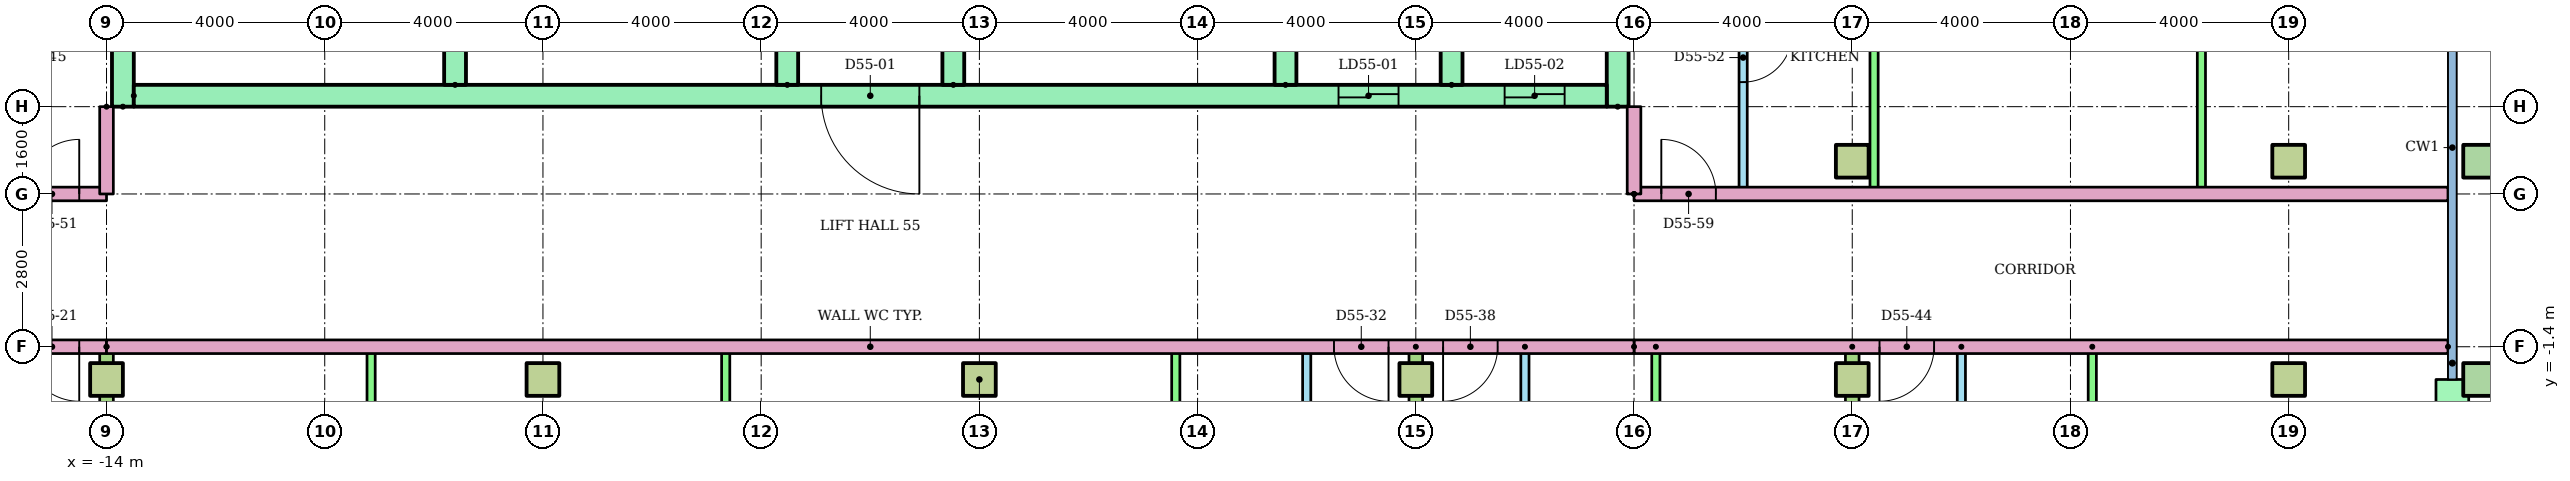
"""IFC4 building model, lengths in metres.
Left out: names, types, materials, properties, quantities, classifications, styles, units other than length and angle.
Written with IfcOpenShell. Run it as: python <this file> out.ifc"""

import sys

from ifc_helpers import new_model, si_unit, direction, frame, frame_2d, origin, origin_2d, place, context, subcontext, project, spatial, rectangle, hollow_rectangle, extrude, element, fill, save


model = new_model("IFC4")
c1 = context("Model", 3, precision=1e-05, world=origin(), true_north=direction((0.0, 1.0)))
c2 = subcontext(c1, "Body", "Model", "MODEL_VIEW")
j1 = project(units=[si_unit("LENGTHUNIT", "METRE"), si_unit("PLANEANGLEUNIT", "RADIAN")], contexts=[c1])
p1 = place(None, origin())
s1 = spatial("IfcSite", under=j1, at=p1, CompositionType="ELEMENT")
p2 = place(p1, origin())
s2 = spatial("IfcBuilding", under=s1, at=p2, CompositionType="ELEMENT")
p3 = place(p2, frame((0.0, 0.0, 214.0)))
s3 = spatial("IfcBuildingStorey", under=s2, at=p3, CompositionType="ELEMENT", Elevation=214.0)
for number, where in (
    (1, (-14.0, -2.0, 0.0)),
    (2, (-6.0, -2.0, 0.0)),
    (3, (2.0, -2.0, 0.0)),
    (4, (10.0, -2.0, 0.0)),
    (5, (18.0, -2.0, 0.0)),
    (6, (26.0, -2.0, 0.0)),
):
    element("IfcColumn", number, at=place(p3, frame(where)), inside=s3, PredefinedType="COLUMN", context=c2, shape_type="SweptSolid", body=[
        extrude(rectangle(XDim=0.6, YDim=0.6, at=origin_2d()), origin(), (0.0, 0.0, 1.0), 3.2),
    ])
p4 = place(p3, frame((29.5, -2.0, 0.0)))
e7 = element("IfcColumn", 7, at=p4, inside=s3, PredefinedType="COLUMN", context=c2, shape_type="SweptSolid", body=[
    extrude(hollow_rectangle(XDim=0.6, YDim=0.6, WallThickness=0.03, at=origin_2d()), origin(), (0.0, 0.0, 1.0), 3.2),
])
for number, where in (
    (8, (18.0, 2.0, 0.0)),
    (9, (26.0, 2.0, 0.0)),
):
    element("IfcColumn", number, at=place(p3, frame(where)), inside=s3, PredefinedType="COLUMN", context=c2, shape_type="SweptSolid", body=[
        extrude(rectangle(XDim=0.6, YDim=0.6, at=origin_2d()), origin(), (0.0, 0.0, 1.0), 3.2),
    ])
p5 = place(p3, frame((29.5, 2.0, 0.0)))
e10 = element("IfcColumn", 10, at=p5, inside=s3, PredefinedType="COLUMN", context=c2, shape_type="SweptSolid", body=[
    extrude(hollow_rectangle(XDim=0.6, YDim=0.6, WallThickness=0.03, at=origin_2d()), origin(), (0.0, 0.0, 1.0), 3.2),
])
p6 = place(p3, frame((29.0, -5.7, 0.0), z_axis=(0.0, 0.0, 1.0), x_axis=(0.0, 1.0, 0.0)))
e11 = element("IfcWall", 11, at=p6, inside=s3, PredefinedType="STANDARD", context=c2, shape_type="SweptSolid", body=[
    extrude(rectangle(XDim=3.7, YDim=0.6, at=frame_2d((1.85, 0.0))), origin(), (0.0, 0.0, 1.0), 2.92),
])
p7 = place(p6, frame((1.25, 0.0, 0.0)))
e12 = element("IfcOpeningElement", 12, at=p7, cuts=e11, PredefinedType="OPENING", context=c2, shape_type="SweptSolid", body=[
    extrude(rectangle(XDim=1.2, YDim=2.1, at=frame_2d((0.6, 1.05))), frame((0.0, 0.31, 0.0), z_axis=(0.0, -1.0, 0.0), x_axis=(1.0, 0.0, 0.0)), (0.0, 0.0, 1.0), 0.62),
])
for number, where, z_axis, x_axis in (
    (13, (-13.7, 3.0, 0.0), (0.0, 0.0, 1.0), (0.0, 1.0, 0.0)),
    (14, (13.7, 3.0, 0.0), (0.0, 0.0, 1.0), (0.0, 1.0, 0.0)),
):
    element("IfcWall", number, at=place(p3, frame(where, z_axis=z_axis, x_axis=x_axis)), inside=s3, PredefinedType="SHEAR", context=c2, shape_type="SweptSolid", body=[
        extrude(rectangle(XDim=17.0, YDim=0.4, at=frame_2d((8.5, 0.0))), origin(), (0.0, 0.0, 1.0), 2.92),
    ])
p8 = place(p3, frame((-13.5, 3.2, 0.0)))
e15 = element("IfcWall", 15, at=p8, inside=s3, PredefinedType="SHEAR", context=c2, shape_type="SweptSolid", body=[
    extrude(rectangle(XDim=27.0, YDim=0.4, at=frame_2d((13.5, 0.0))), origin(), (0.0, 0.0, 1.0), 2.92),
])
p9 = place(p8, frame((22.083, 0.0, 0.0)))
e16 = element("IfcOpeningElement", 16, at=p9, cuts=e15, PredefinedType="OPENING", context=c2, shape_type="SweptSolid", body=[
    extrude(rectangle(XDim=1.1, YDim=2.1, at=frame_2d((0.55, 1.05))), frame((0.0, 0.21, 0.0), z_axis=(0.0, -1.0, 0.0), x_axis=(1.0, 0.0, 0.0)), (0.0, 0.0, 1.0), 0.42),
])
p10 = place(p8, frame((25.128, 0.0, 0.0)))
e17 = element("IfcOpeningElement", 17, at=p10, cuts=e15, PredefinedType="OPENING", context=c2, shape_type="SweptSolid", body=[
    extrude(rectangle(XDim=1.1, YDim=2.1, at=frame_2d((0.55, 1.05))), frame((0.0, 0.21, 0.0), z_axis=(0.0, -1.0, 0.0), x_axis=(1.0, 0.0, 0.0)), (0.0, 0.0, 1.0), 0.42),
])
p11 = place(p8, frame((12.6, 0.0, 0.0)))
e18 = element("IfcOpeningElement", 18, at=p11, cuts=e15, PredefinedType="OPENING", context=c2, shape_type="SweptSolid", body=[
    extrude(rectangle(XDim=1.8, YDim=2.1, at=frame_2d((0.9, 1.05))), frame((0.0, 0.21, 0.0), z_axis=(0.0, -1.0, 0.0), x_axis=(1.0, 0.0, 0.0)), (0.0, 0.0, 1.0), 0.42),
])
for number, where, z_axis, x_axis in (
    (19, (-7.611, 3.4, 0.0), (0.0, 0.0, 1.0), (0.0, 1.0, 0.0)),
    (20, (-1.522, 3.4, 0.0), (0.0, 0.0, 1.0), (0.0, 1.0, 0.0)),
    (21, (1.522, 3.4, 0.0), (0.0, 0.0, 1.0), (0.0, 1.0, 0.0)),
    (22, (7.611, 3.4, 0.0), (0.0, 0.0, 1.0), (0.0, 1.0, 0.0)),
    (23, (10.656, 3.4, 0.0), (0.0, 0.0, 1.0), (0.0, 1.0, 0.0)),
):
    element("IfcWall", number, at=place(p3, frame(where, z_axis=z_axis, x_axis=x_axis)), inside=s3, PredefinedType="SHEAR", context=c2, shape_type="SweptSolid", body=[
        extrude(rectangle(XDim=3.0, YDim=0.4, at=frame_2d((1.5, 0.0))), origin(), (0.0, 0.0, 1.0), 2.92),
    ])
p12 = place(p3, frame((8.0, -8.2, 0.0), z_axis=(0.0, 0.0, 1.0), x_axis=(0.0, 1.0, 0.0)))
e24 = element("IfcWall", 24, at=p12, inside=s3, PredefinedType="PARTITIONING", context=c2, shape_type="SweptSolid", body=[
    extrude(rectangle(XDim=6.8, YDim=0.15, at=frame_2d((3.4, 0.0))), origin(), (0.0, 0.0, 1.0), 2.4),
])
p13 = place(p12, frame((4.475, 0.0, 0.0)))
e25 = element("IfcOpeningElement", 25, at=p13, cuts=e24, PredefinedType="OPENING", context=c2, shape_type="SweptSolid", body=[
    extrude(rectangle(XDim=0.9, YDim=2.1, at=frame_2d((0.45, 1.05))), frame((0.0, 0.085, 0.0), z_axis=(0.0, -1.0, 0.0), x_axis=(1.0, 0.0, 0.0)), (0.0, 0.0, 1.0), 0.17),
])
p14 = place(p12, frame((1.125, 0.0, 0.0)))
e26 = element("IfcOpeningElement", 26, at=p14, cuts=e24, PredefinedType="OPENING", context=c2, shape_type="SweptSolid", body=[
    extrude(rectangle(XDim=0.8, YDim=2.1, at=frame_2d((0.4, 1.05))), frame((0.0, 0.085, 0.0), z_axis=(0.0, -1.0, 0.0), x_axis=(1.0, 0.0, 0.0)), (0.0, 0.0, 1.0), 0.17),
])
for number, where, z_axis, x_axis in (
    (27, (5.6, -8.2, 0.0), (0.0, 0.0, 1.0), (0.0, 1.0, 0.0)),
    (28, (-2.65, -8.2, 0.0), (0.0, 0.0, 1.0), (0.0, 1.0, 0.0)),
    (29, (-9.15, -8.2, 0.0), (0.0, 0.0, 1.0), (0.0, 1.0, 0.0)),
):
    element("IfcWall", number, at=place(p3, frame(where, z_axis=z_axis, x_axis=x_axis)), inside=s3, PredefinedType="PARTITIONING", context=c2, shape_type="SweptSolid", body=[
        extrude(rectangle(XDim=6.8, YDim=0.15, at=frame_2d((3.4, 0.0))), origin(), (0.0, 0.0, 1.0), 2.4),
    ])
p15 = place(p3, frame((-14.0, -1.4, 0.0), z_axis=(0.0, 0.0, 1.0), x_axis=(0.0, -1.0, 0.0)))
e30 = element("IfcWall", 30, at=p15, inside=s3, PredefinedType="PARTITIONING", context=c2, shape_type="SweptSolid", body=[
    extrude(rectangle(XDim=15.11, YDim=0.25, at=frame_2d((7.555, 0.0))), origin(), (0.0, 0.0, 1.0), 2.4),
])
p16 = place(p3, frame((12.0, -1.4, 0.0), z_axis=(0.0, 0.0, 1.0), x_axis=(0.0, -1.0, 0.0)))
e31 = element("IfcWall", 31, at=p16, inside=s3, PredefinedType="PARTITIONING", context=c2, shape_type="SweptSolid", body=[
    extrude(rectangle(XDim=6.8, YDim=0.15, at=frame_2d((3.4, 0.0))), origin(), (0.0, 0.0, 1.0), 2.4),
])
p17 = place(p16, frame((1.425, 0.0, 0.0)))
e32 = element("IfcOpeningElement", 32, at=p17, cuts=e31, PredefinedType="OPENING", context=c2, shape_type="SweptSolid", body=[
    extrude(rectangle(XDim=0.9, YDim=2.1, at=frame_2d((0.45, 1.05))), frame((0.0, 0.085, 0.0), z_axis=(0.0, -1.0, 0.0), x_axis=(1.0, 0.0, 0.0)), (0.0, 0.0, 1.0), 0.17),
])
p18 = place(p16, frame((4.875, 0.0, 0.0)))
e33 = element("IfcOpeningElement", 33, at=p18, cuts=e31, PredefinedType="OPENING", context=c2, shape_type="SweptSolid", body=[
    extrude(rectangle(XDim=0.8, YDim=2.1, at=frame_2d((0.4, 1.05))), frame((0.0, 0.085, 0.0), z_axis=(0.0, -1.0, 0.0), x_axis=(1.0, 0.0, 0.0)), (0.0, 0.0, 1.0), 0.17),
])
p19 = place(p3, frame((14.4, -1.4, 0.0), z_axis=(0.0, 0.0, 1.0), x_axis=(0.0, -1.0, 0.0)))
e34 = element("IfcWall", 34, at=p19, inside=s3, PredefinedType="PARTITIONING", context=c2, shape_type="SweptSolid", body=[
    extrude(rectangle(XDim=6.8, YDim=0.15, at=frame_2d((3.4, 0.0))), origin(), (0.0, 0.0, 1.0), 2.4),
])
p20 = place(p3, frame((10.0, -1.4, 0.0), z_axis=(0.0, 0.0, 1.0), x_axis=(0.0, -1.0, 0.0)))
e35 = element("IfcWall", 35, at=p20, inside=s3, PredefinedType="PARTITIONING", context=c2, shape_type="SweptSolid", body=[
    extrude(rectangle(XDim=15.11, YDim=0.25, at=frame_2d((7.555, 0.0))), origin(), (0.0, 0.0, 1.0), 2.4),
])
p21 = place(p3, frame((20.0, -1.4, 0.0), z_axis=(0.0, 0.0, 1.0), x_axis=(0.0, -1.0, 0.0)))
e36 = element("IfcWall", 36, at=p21, inside=s3, PredefinedType="PARTITIONING", context=c2, shape_type="SweptSolid", body=[
    extrude(rectangle(XDim=6.8, YDim=0.15, at=frame_2d((3.4, 0.0))), origin(), (0.0, 0.0, 1.0), 2.4),
])
p22 = place(p21, frame((1.425, 0.0, 0.0)))
e37 = element("IfcOpeningElement", 37, at=p22, cuts=e36, PredefinedType="OPENING", context=c2, shape_type="SweptSolid", body=[
    extrude(rectangle(XDim=0.9, YDim=2.1, at=frame_2d((0.45, 1.05))), frame((0.0, 0.085, 0.0), z_axis=(0.0, -1.0, 0.0), x_axis=(1.0, 0.0, 0.0)), (0.0, 0.0, 1.0), 0.17),
])
p23 = place(p21, frame((4.875, 0.0, 0.0)))
e38 = element("IfcOpeningElement", 38, at=p23, cuts=e36, PredefinedType="OPENING", context=c2, shape_type="SweptSolid", body=[
    extrude(rectangle(XDim=0.8, YDim=2.1, at=frame_2d((0.4, 1.05))), frame((0.0, 0.085, 0.0), z_axis=(0.0, -1.0, 0.0), x_axis=(1.0, 0.0, 0.0)), (0.0, 0.0, 1.0), 0.17),
])
p24 = place(p3, frame((22.4, -1.4, 0.0), z_axis=(0.0, 0.0, 1.0), x_axis=(0.0, -1.0, 0.0)))
e39 = element("IfcWall", 39, at=p24, inside=s3, PredefinedType="PARTITIONING", context=c2, shape_type="SweptSolid", body=[
    extrude(rectangle(XDim=6.8, YDim=0.15, at=frame_2d((3.4, 0.0))), origin(), (0.0, 0.0, 1.0), 2.4),
])
p25 = place(p3, frame((18.0, -1.4, 0.0), z_axis=(0.0, 0.0, 1.0), x_axis=(0.0, -1.0, 0.0)))
e40 = element("IfcWall", 40, at=p25, inside=s3, PredefinedType="PARTITIONING", context=c2, shape_type="SweptSolid", body=[
    extrude(rectangle(XDim=15.11, YDim=0.25, at=frame_2d((7.555, 0.0))), origin(), (0.0, 0.0, 1.0), 2.4),
])
p26 = place(p3, frame((-14.0, -1.4, 0.0), z_axis=(0.0, 0.0, 1.0), x_axis=(-1.0, 0.0, 0.0)))
e41 = element("IfcWall", 41, at=p26, inside=s3, PredefinedType="PARTITIONING", context=c2, shape_type="SweptSolid", body=[
    extrude(rectangle(XDim=14.92, YDim=0.25, at=frame_2d((7.46, 0.0))), origin(), (0.0, 0.0, 1.0), 2.4),
])
p27 = place(p26, frame((0.5, 0.0, 0.0)))
e42 = element("IfcOpeningElement", 42, at=p27, cuts=e41, PredefinedType="OPENING", context=c2, shape_type="SweptSolid", body=[
    extrude(rectangle(XDim=1.0, YDim=2.1, at=frame_2d((0.5, 1.05))), frame((0.0, 0.135, 0.0), z_axis=(0.0, -1.0, 0.0), x_axis=(1.0, 0.0, 0.0)), (0.0, 0.0, 1.0), 0.27),
])
p28 = place(p3, frame((28.92, -1.4, 0.0), z_axis=(0.0, 0.0, 1.0), x_axis=(-1.0, 0.0, 0.0)))
e43 = element("IfcWall", 43, at=p28, inside=s3, PredefinedType="PARTITIONING", context=c2, shape_type="SweptSolid", body=[
    extrude(rectangle(XDim=14.92, YDim=0.25, at=frame_2d((7.46, 0.0))), origin(), (0.0, 0.0, 1.0), 2.4),
])
p29 = place(p28, frame((9.42, 0.0, 0.0)))
e44 = element("IfcOpeningElement", 44, at=p29, cuts=e43, PredefinedType="OPENING", context=c2, shape_type="SweptSolid", body=[
    extrude(rectangle(XDim=1.0, YDim=2.1, at=frame_2d((0.5, 1.05))), frame((0.0, 0.135, 0.0), z_axis=(0.0, -1.0, 0.0), x_axis=(1.0, 0.0, 0.0)), (0.0, 0.0, 1.0), 0.27),
])
p30 = place(p3, frame((-28.92, 1.4, 0.0)))
e45 = element("IfcWall", 45, at=p30, inside=s3, PredefinedType="PARTITIONING", context=c2, shape_type="SweptSolid", body=[
    extrude(rectangle(XDim=14.92, YDim=0.25, at=frame_2d((7.46, 0.0))), origin(), (0.0, 0.0, 1.0), 2.4),
])
p31 = place(p30, frame((13.42, 0.0, 0.0)))
e46 = element("IfcOpeningElement", 46, at=p31, cuts=e45, PredefinedType="OPENING", context=c2, shape_type="SweptSolid", body=[
    extrude(rectangle(XDim=1.0, YDim=2.1, at=frame_2d((0.5, 1.05))), frame((0.0, 0.135, 0.0), z_axis=(0.0, -1.0, 0.0), x_axis=(1.0, 0.0, 0.0)), (0.0, 0.0, 1.0), 0.27),
])
p32 = place(p3, frame((16.0, 10.6, 0.0), z_axis=(0.0, 0.0, 1.0), x_axis=(0.0, -1.0, 0.0)))
e47 = element("IfcWall", 47, at=p32, inside=s3, PredefinedType="PARTITIONING", context=c2, shape_type="SweptSolid", body=[
    extrude(rectangle(XDim=9.2, YDim=0.15, at=frame_2d((4.6, 0.0))), origin(), (0.0, 0.0, 1.0), 2.4),
])
p33 = place(p32, frame((6.25, 0.0, 0.0)))
e48 = element("IfcOpeningElement", 48, at=p33, cuts=e47, PredefinedType="OPENING", context=c2, shape_type="SweptSolid", body=[
    extrude(rectangle(XDim=0.9, YDim=2.1, at=frame_2d((0.45, 1.05))), frame((0.0, 0.085, 0.0), z_axis=(0.0, -1.0, 0.0), x_axis=(1.0, 0.0, 0.0)), (0.0, 0.0, 1.0), 0.17),
])
p34 = place(p32, frame((1.7, 0.0, 0.0)))
e49 = element("IfcOpeningElement", 49, at=p34, cuts=e47, PredefinedType="OPENING", context=c2, shape_type="SweptSolid", body=[
    extrude(rectangle(XDim=0.8, YDim=2.1, at=frame_2d((0.4, 1.05))), frame((0.0, 0.085, 0.0), z_axis=(0.0, -1.0, 0.0), x_axis=(1.0, 0.0, 0.0)), (0.0, 0.0, 1.0), 0.17),
])
for number, where, z_axis, x_axis in (
    (50, (18.4, 10.6, 0.0), (0.0, 0.0, 1.0), (0.0, -1.0, 0.0)),
    (51, (24.4, 10.6, 0.0), (0.0, 0.0, 1.0), (0.0, -1.0, 0.0)),
):
    element("IfcWall", number, at=place(p3, frame(where, z_axis=z_axis, x_axis=x_axis)), inside=s3, PredefinedType="PARTITIONING", context=c2, shape_type="SweptSolid", body=[
        extrude(rectangle(XDim=9.2, YDim=0.15, at=frame_2d((4.6, 0.0))), origin(), (0.0, 0.0, 1.0), 2.4),
    ])
p35 = place(p3, frame((14.0, 1.4, 0.0)))
e52 = element("IfcWall", 52, at=p35, inside=s3, PredefinedType="PARTITIONING", context=c2, shape_type="SweptSolid", body=[
    extrude(rectangle(XDim=14.92, YDim=0.25, at=frame_2d((7.46, 0.0))), origin(), (0.0, 0.0, 1.0), 2.4),
])
p36 = place(p35, frame((0.5, 0.0, 0.0)))
e53 = element("IfcOpeningElement", 53, at=p36, cuts=e52, PredefinedType="OPENING", context=c2, shape_type="SweptSolid", body=[
    extrude(rectangle(XDim=1.0, YDim=2.1, at=frame_2d((0.5, 1.05))), frame((0.0, 0.135, 0.0), z_axis=(0.0, -1.0, 0.0), x_axis=(1.0, 0.0, 0.0)), (0.0, 0.0, 1.0), 0.27),
])
p37 = place(p3, frame((14.0, -1.4, 0.0), z_axis=(0.0, 0.0, 1.0), x_axis=(-1.0, 0.0, 0.0)))
e54 = element("IfcWall", 54, at=p37, inside=s3, PredefinedType="PARTITIONING", context=c2, shape_type="SweptSolid", body=[
    extrude(rectangle(XDim=28.0, YDim=0.25, at=frame_2d((14.0, 0.0))), origin(), (0.0, 0.0, 1.0), 2.4),
])
p38 = place(p37, frame((4.5, 0.0, 0.0)))
e55 = element("IfcOpeningElement", 55, at=p38, cuts=e54, PredefinedType="OPENING", context=c2, shape_type="SweptSolid", body=[
    extrude(rectangle(XDim=1.0, YDim=2.1, at=frame_2d((0.5, 1.05))), frame((0.0, 0.135, 0.0), z_axis=(0.0, -1.0, 0.0), x_axis=(1.0, 0.0, 0.0)), (0.0, 0.0, 1.0), 0.27),
])
p39 = place(p37, frame((2.5, 0.0, 0.0)))
e56 = element("IfcOpeningElement", 56, at=p39, cuts=e54, PredefinedType="OPENING", context=c2, shape_type="SweptSolid", body=[
    extrude(rectangle(XDim=1.0, YDim=2.1, at=frame_2d((0.5, 1.05))), frame((0.0, 0.135, 0.0), z_axis=(0.0, -1.0, 0.0), x_axis=(1.0, 0.0, 0.0)), (0.0, 0.0, 1.0), 0.27),
])
for number, where, z_axis, x_axis in (
    (57, (-14.0, 3.0, 0.0), (0.0, 0.0, 1.0), (0.0, -1.0, 0.0)),
    (58, (14.0, 1.4, 0.0), (0.0, 0.0, 1.0), (0.0, 1.0, 0.0)),
):
    element("IfcWall", number, at=place(p3, frame(where, z_axis=z_axis, x_axis=x_axis)), inside=s3, PredefinedType="PARTITIONING", context=c2, shape_type="SweptSolid", body=[
        extrude(rectangle(XDim=1.6, YDim=0.25, at=frame_2d((0.8, 0.0))), origin(), (0.0, 0.0, 1.0), 2.4),
    ])
p40 = place(p9, origin())
e59 = element("IfcDoor", 59, at=p40, inside=s3, OperationType="SLIDING_TO_LEFT", PredefinedType="DOOR", context=c2, shape_type="SweptSolid", body=[
    extrude(rectangle(XDim=1.1, YDim=2.1, at=frame_2d((0.55, 1.05))), frame((0.0, 0.025, 0.0), z_axis=(0.0, -1.0, 0.0), x_axis=(1.0, 0.0, 0.0)), (0.0, 0.0, 1.0), 0.05),
])
fill(e16, e59)
p41 = place(p10, origin())
e60 = element("IfcDoor", 60, at=p41, inside=s3, OperationType="SLIDING_TO_LEFT", PredefinedType="DOOR", context=c2, shape_type="SweptSolid", body=[
    extrude(rectangle(XDim=1.1, YDim=2.1, at=frame_2d((0.55, 1.05))), frame((0.0, 0.025, 0.0), z_axis=(0.0, -1.0, 0.0), x_axis=(1.0, 0.0, 0.0)), (0.0, 0.0, 1.0), 0.05),
])
fill(e17, e60)
p42 = place(p11, frame((1.8, 0.0, 0.0), z_axis=(0.0, 0.0, 1.0), x_axis=(-1.0, 0.0, 0.0)))
e61 = element("IfcDoor", 61, at=p42, inside=s3, OperationType="DOUBLE_DOOR_SINGLE_SWING", PredefinedType="DOOR", context=c2, shape_type="SweptSolid", body=[
    extrude(rectangle(XDim=1.8, YDim=2.1, at=frame_2d((0.9, 1.05))), frame((0.0, 0.025, 0.0), z_axis=(0.0, -1.0, 0.0), x_axis=(1.0, 0.0, 0.0)), (0.0, 0.0, 1.0), 0.05),
])
fill(e18, e61)
p43 = place(p27, origin())
e62 = element("IfcDoor", 62, at=p43, inside=s3, OperationType="SINGLE_SWING_LEFT", PredefinedType="DOOR", context=c2, shape_type="SweptSolid", body=[
    extrude(rectangle(XDim=1.0, YDim=2.1, at=frame_2d((0.5, 1.05))), frame((0.0, 0.025, 0.0), z_axis=(0.0, -1.0, 0.0), x_axis=(1.0, 0.0, 0.0)), (0.0, 0.0, 1.0), 0.05),
])
fill(e42, e62)
p44 = place(p38, origin())
e63 = element("IfcDoor", 63, at=p44, inside=s3, OperationType="SINGLE_SWING_LEFT", PredefinedType="DOOR", context=c2, shape_type="SweptSolid", body=[
    extrude(rectangle(XDim=1.0, YDim=2.1, at=frame_2d((0.5, 1.05))), frame((0.0, 0.025, 0.0), z_axis=(0.0, -1.0, 0.0), x_axis=(1.0, 0.0, 0.0)), (0.0, 0.0, 1.0), 0.05),
])
fill(e55, e63)
p45 = place(p39, origin())
e64 = element("IfcDoor", 64, at=p45, inside=s3, OperationType="SINGLE_SWING_RIGHT", PredefinedType="DOOR", context=c2, shape_type="SweptSolid", body=[
    extrude(rectangle(XDim=1.0, YDim=2.1, at=frame_2d((0.5, 1.05))), frame((0.0, 0.025, 0.0), z_axis=(0.0, -1.0, 0.0), x_axis=(1.0, 0.0, 0.0)), (0.0, 0.0, 1.0), 0.05),
])
fill(e56, e64)
p46 = place(p29, origin())
e65 = element("IfcDoor", 65, at=p46, inside=s3, OperationType="SINGLE_SWING_RIGHT", PredefinedType="DOOR", context=c2, shape_type="SweptSolid", body=[
    extrude(rectangle(XDim=1.0, YDim=2.1, at=frame_2d((0.5, 1.05))), frame((0.0, 0.025, 0.0), z_axis=(0.0, -1.0, 0.0), x_axis=(1.0, 0.0, 0.0)), (0.0, 0.0, 1.0), 0.05),
])
fill(e44, e65)
p47 = place(p31, origin())
e66 = element("IfcDoor", 66, at=p47, inside=s3, OperationType="SINGLE_SWING_RIGHT", PredefinedType="DOOR", context=c2, shape_type="SweptSolid", body=[
    extrude(rectangle(XDim=1.0, YDim=2.1, at=frame_2d((0.5, 1.05))), frame((0.0, 0.025, 0.0), z_axis=(0.0, -1.0, 0.0), x_axis=(1.0, 0.0, 0.0)), (0.0, 0.0, 1.0), 0.05),
])
fill(e46, e66)
p48 = place(p33, origin())
e67 = element("IfcDoor", 67, at=p48, inside=s3, OperationType="SINGLE_SWING_LEFT", PredefinedType="DOOR", context=c2, shape_type="SweptSolid", body=[
    extrude(rectangle(XDim=0.9, YDim=2.1, at=frame_2d((0.45, 1.05))), frame((0.0, 0.025, 0.0), z_axis=(0.0, -1.0, 0.0), x_axis=(1.0, 0.0, 0.0)), (0.0, 0.0, 1.0), 0.05),
])
fill(e48, e67)
p49 = place(p36, origin())
e68 = element("IfcDoor", 68, at=p49, inside=s3, OperationType="SINGLE_SWING_LEFT", PredefinedType="DOOR", context=c2, shape_type="SweptSolid", body=[
    extrude(rectangle(XDim=1.0, YDim=2.1, at=frame_2d((0.5, 1.05))), frame((0.0, 0.025, 0.0), z_axis=(0.0, -1.0, 0.0), x_axis=(1.0, 0.0, 0.0)), (0.0, 0.0, 1.0), 0.05),
])
fill(e53, e68)
save(model, sys.argv[1])
